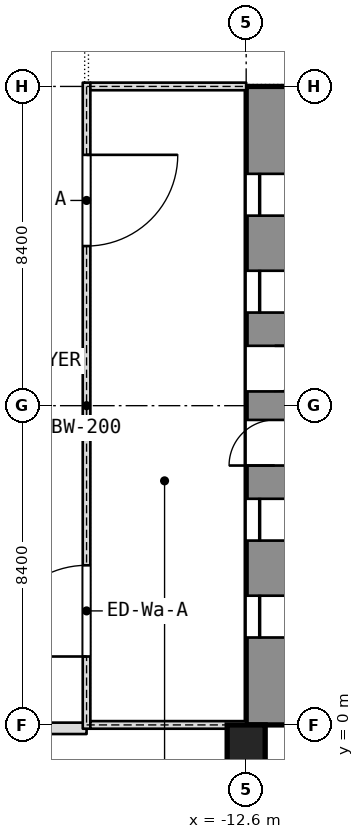
"""IFC4 building model, lengths in metres.
Left out: names, types, materials, properties, quantities, classifications, styles, units other than length and angle.
Written with IfcOpenShell. Run it as: python <this file> out.ifc"""

import sys

from ifc_helpers import new_model, si_unit, direction, frame, frame_2d, origin, origin_2d, place, context, subcontext, project, spatial, rectangle, extrude, element, fill, save


model = new_model("IFC4")
c1 = context("Model", 3, precision=1e-05, world=origin(), true_north=direction((0.0, 1.0)))
c2 = subcontext(c1, "Body", "Model", "MODEL_VIEW")
j1 = project(units=[si_unit("LENGTHUNIT", "METRE"), si_unit("PLANEANGLEUNIT", "RADIAN")], contexts=[c1])
p1 = place(None, origin())
s1 = spatial("IfcSite", under=j1, at=p1, CompositionType="ELEMENT")
p2 = place(p1, origin())
s2 = spatial("IfcBuilding", under=s1, at=p2, CompositionType="ELEMENT")
p3 = place(p2, frame((0.0, 0.0, 21.0)))
s3 = spatial("IfcBuildingStorey", under=s2, at=p3, CompositionType="ELEMENT", Elevation=21.0)
p4 = place(p3, frame((-11.85, 0.0, 0.0), z_axis=(0.0, 0.0, 1.0), x_axis=(0.0, 1.0, 0.0)))
e1 = element("IfcWall", 1, at=p4, inside=s3, PredefinedType="SHEAR", context=c2, shape_type="SweptSolid", body=[
    extrude(rectangle(XDim=16.8, YDim=1.5, at=frame_2d((8.4, 0.0))), origin(), (0.0, 0.0, 1.0), 5.0),
])
p5 = place(p4, frame((2.3, 0.0, 0.0)))
e2 = element("IfcOpeningElement", 2, at=p5, cuts=e1, PredefinedType="OPENING", context=c2, shape_type="SweptSolid", body=[
    extrude(rectangle(XDim=1.1, YDim=2.1, at=frame_2d((0.55, 1.05))), frame((0.0, 0.75, 0.0), z_axis=(0.0, -1.0, 0.0), x_axis=(1.0, 0.0, 0.0)), (0.0, 0.0, 1.0), 1.5),
])
p6 = place(p4, frame((4.85, 0.0, 0.0)))
e3 = element("IfcOpeningElement", 3, at=p6, cuts=e1, PredefinedType="OPENING", context=c2, shape_type="SweptSolid", body=[
    extrude(rectangle(XDim=1.1, YDim=2.1, at=frame_2d((0.55, 1.05))), frame((0.0, 0.75, 0.0), z_axis=(0.0, -1.0, 0.0), x_axis=(1.0, 0.0, 0.0)), (0.0, 0.0, 1.0), 1.5),
])
p7 = place(p4, frame((6.825, 0.0, 0.0)))
e4 = element("IfcOpeningElement", 4, at=p7, cuts=e1, PredefinedType="OPENING", context=c2, shape_type="SweptSolid", body=[
    extrude(rectangle(XDim=1.2, YDim=2.1, at=frame_2d((0.6, 1.05))), frame((0.0, 0.75, 0.0), z_axis=(0.0, -1.0, 0.0), x_axis=(1.0, 0.0, 0.0)), (0.0, 0.0, 1.0), 1.5),
])
p8 = place(p4, frame((13.4, 0.0, 0.0)))
e5 = element("IfcOpeningElement", 5, at=p8, cuts=e1, PredefinedType="OPENING", context=c2, shape_type="SweptSolid", body=[
    extrude(rectangle(XDim=1.1, YDim=2.1, at=frame_2d((0.55, 1.05))), frame((0.0, 0.75, 0.0), z_axis=(0.0, -1.0, 0.0), x_axis=(1.0, 0.0, 0.0)), (0.0, 0.0, 1.0), 1.5),
])
p9 = place(p4, frame((10.85, 0.0, 0.0)))
e6 = element("IfcOpeningElement", 6, at=p9, cuts=e1, PredefinedType="OPENING", context=c2, shape_type="SweptSolid", body=[
    extrude(rectangle(XDim=1.1, YDim=2.1, at=frame_2d((0.55, 1.05))), frame((0.0, 0.75, 0.0), z_axis=(0.0, -1.0, 0.0), x_axis=(1.0, 0.0, 0.0)), (0.0, 0.0, 1.0), 1.5),
])
p10 = place(p4, frame((8.775, 0.0, 0.0)))
e7 = element("IfcOpeningElement", 7, at=p10, cuts=e1, PredefinedType="OPENING", context=c2, shape_type="SweptSolid", body=[
    extrude(rectangle(XDim=1.2, YDim=2.1, at=frame_2d((0.6, 1.05))), frame((0.0, 0.75, 0.0), z_axis=(0.0, -1.0, 0.0), x_axis=(1.0, 0.0, 0.0)), (0.0, 0.0, 1.0), 1.5),
])
p11 = place(p3, frame((-12.6, -0.5, 0.0), z_axis=(0.0, 0.0, 1.0), x_axis=(1.0, 0.0, 0.0)))
e8 = element("IfcColumn", 8, at=p11, inside=s3, PredefinedType="COLUMN", context=c2, shape_type="SweptSolid", body=[
    extrude(rectangle(XDim=1.0, YDim=1.0, at=origin_2d()), origin(), (0.0, 0.0, 1.0), 5.0),
])
p12 = place(p3, frame((-20.06, -0.09, 0.0), z_axis=(0.0, 0.0, 1.0), x_axis=(1.0, 0.0, 0.0)))
e9 = element("IfcWall", 9, at=p12, inside=s3, PredefinedType="NOTDEFINED", context=c2, shape_type="SweptSolid", body=[
    extrude(rectangle(XDim=3.26, YDim=0.3, at=frame_2d((1.63, 0.0))), origin(), (0.0, 0.0, 1.0), 5.0),
])
p13 = place(p3, frame((-16.8, -0.1, 0.0), z_axis=(0.0, 0.0, 1.0), x_axis=(0.0, 1.0, 0.0)))
e10 = element("IfcWall", 10, at=p13, inside=s3, PredefinedType="PARTITIONING", context=c2, shape_type="SweptSolid", body=[
    extrude(rectangle(XDim=17.0, YDim=0.2, at=frame_2d((8.5, 0.0))), origin(), (0.0, 0.0, 1.0), 4.78),
])
p14 = place(p13, frame((1.9, 0.0, 0.0)))
e11 = element("IfcOpeningElement", 11, at=p14, cuts=e10, PredefinedType="OPENING", context=c2, shape_type="SweptSolid", body=[
    extrude(rectangle(XDim=2.4, YDim=2.1, at=frame_2d((1.2, 1.05))), frame((0.0, 0.1, 0.0), z_axis=(0.0, -1.0, 0.0), x_axis=(1.0, 0.0, 0.0)), (0.0, 0.0, 1.0), 0.2),
])
p15 = place(p13, frame((12.7, 0.0, 0.0)))
e12 = element("IfcOpeningElement", 12, at=p15, cuts=e10, PredefinedType="OPENING", context=c2, shape_type="SweptSolid", body=[
    extrude(rectangle(XDim=2.4, YDim=2.1, at=frame_2d((1.2, 1.05))), frame((0.0, 0.1, 0.0), z_axis=(0.0, -1.0, 0.0), x_axis=(1.0, 0.0, 0.0)), (0.0, 0.0, 1.0), 0.2),
])
for number, where, z_axis, x_axis in (
    (13, (-16.7, 0.0, 0.0), (0.0, 0.0, 1.0), (1.0, 0.0, 0.0)),
    (14, (-16.7, 16.8, 0.0), (0.0, 0.0, 1.0), (1.0, 0.0, 0.0)),
):
    element("IfcWall", number, at=place(p3, frame(where, z_axis=z_axis, x_axis=x_axis)), inside=s3, PredefinedType="PARTITIONING", context=c2, shape_type="SweptSolid", body=[
        extrude(rectangle(XDim=4.1, YDim=0.2, at=frame_2d((2.05, 0.0))), origin(), (0.0, 0.0, 1.0), 4.78),
    ])
p16 = place(p5, origin())
e15 = element("IfcDoor", 15, at=p16, inside=s3, OperationType="SLIDING_TO_LEFT", PredefinedType="DOOR", context=c2, shape_type="SweptSolid", body=[
    extrude(rectangle(XDim=1.1, YDim=2.1, at=frame_2d((0.55, 1.05))), frame((0.0, 0.025, 0.0), z_axis=(0.0, -1.0, 0.0), x_axis=(1.0, 0.0, 0.0)), (0.0, 0.0, 1.0), 0.05),
])
fill(e2, e15)
p17 = place(p6, origin())
e16 = element("IfcDoor", 16, at=p17, inside=s3, OperationType="SLIDING_TO_LEFT", PredefinedType="DOOR", context=c2, shape_type="SweptSolid", body=[
    extrude(rectangle(XDim=1.1, YDim=2.1, at=frame_2d((0.55, 1.05))), frame((0.0, 0.025, 0.0), z_axis=(0.0, -1.0, 0.0), x_axis=(1.0, 0.0, 0.0)), (0.0, 0.0, 1.0), 0.05),
])
fill(e3, e16)
p18 = place(p7, origin())
e17 = element("IfcDoor", 17, at=p18, inside=s3, OperationType="SINGLE_SWING_LEFT", PredefinedType="DOOR", context=c2, shape_type="SweptSolid", body=[
    extrude(rectangle(XDim=1.2, YDim=2.1, at=frame_2d((0.6, 1.05))), frame((0.0, 0.025, 0.0), z_axis=(0.0, -1.0, 0.0), x_axis=(1.0, 0.0, 0.0)), (0.0, 0.0, 1.0), 0.05),
])
fill(e4, e17)
p19 = place(p8, origin())
e18 = element("IfcDoor", 18, at=p19, inside=s3, OperationType="SLIDING_TO_LEFT", PredefinedType="DOOR", context=c2, shape_type="SweptSolid", body=[
    extrude(rectangle(XDim=1.1, YDim=2.1, at=frame_2d((0.55, 1.05))), frame((0.0, 0.025, 0.0), z_axis=(0.0, -1.0, 0.0), x_axis=(1.0, 0.0, 0.0)), (0.0, 0.0, 1.0), 0.05),
])
fill(e5, e18)
p20 = place(p9, origin())
e19 = element("IfcDoor", 19, at=p20, inside=s3, OperationType="SLIDING_TO_LEFT", PredefinedType="DOOR", context=c2, shape_type="SweptSolid", body=[
    extrude(rectangle(XDim=1.1, YDim=2.1, at=frame_2d((0.55, 1.05))), frame((0.0, 0.025, 0.0), z_axis=(0.0, -1.0, 0.0), x_axis=(1.0, 0.0, 0.0)), (0.0, 0.0, 1.0), 0.05),
])
fill(e6, e19)
p21 = place(p10, origin())
e20 = element("IfcDoor", 20, at=p21, inside=s3, OperationType="SINGLE_SWING_LEFT", PredefinedType="DOOR", context=c2, shape_type="SweptSolid", body=[
    extrude(rectangle(XDim=1.2, YDim=2.1, at=frame_2d((0.6, 1.05))), frame((0.0, 0.025, 0.0), z_axis=(0.0, -1.0, 0.0), x_axis=(1.0, 0.0, 0.0)), (0.0, 0.0, 1.0), 0.05),
])
fill(e7, e20)
p22 = place(p14, origin())
e21 = element("IfcDoor", 21, at=p22, inside=s3, OperationType="DOUBLE_DOOR_SINGLE_SWING", PredefinedType="DOOR", context=c2, shape_type="SweptSolid", body=[
    extrude(rectangle(XDim=2.4, YDim=2.1, at=frame_2d((1.2, 1.05))), frame((0.0, 0.025, 0.0), z_axis=(0.0, -1.0, 0.0), x_axis=(1.0, 0.0, 0.0)), (0.0, 0.0, 1.0), 0.05),
])
fill(e11, e21)
p23 = place(p15, origin())
e22 = element("IfcDoor", 22, at=p23, inside=s3, OperationType="DOUBLE_DOOR_SINGLE_SWING", PredefinedType="DOOR", context=c2, shape_type="SweptSolid", body=[
    extrude(rectangle(XDim=2.4, YDim=2.1, at=frame_2d((1.2, 1.05))), frame((0.0, 0.025, 0.0), z_axis=(0.0, -1.0, 0.0), x_axis=(1.0, 0.0, 0.0)), (0.0, 0.0, 1.0), 0.05),
])
fill(e12, e22)
save(model, sys.argv[1])
